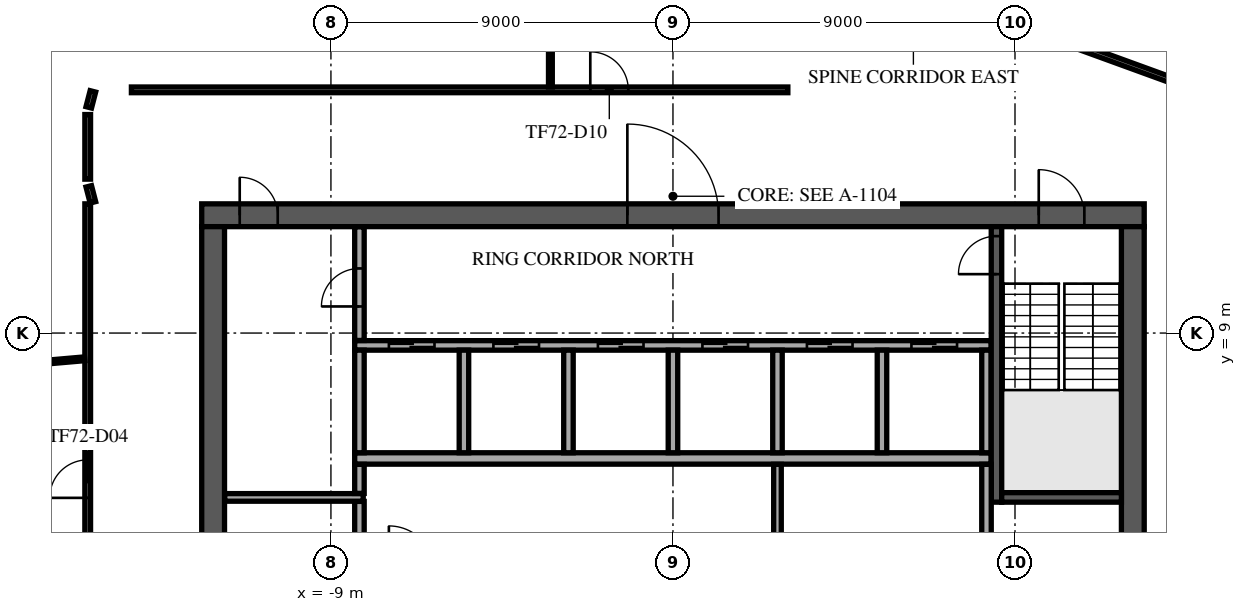
"""IFC4 building model, lengths in metres.
Left out: names, types, materials, properties, quantities, classifications, styles, units other than length and angle.
Written with IfcOpenShell. Run it as: python <this file> out.ifc"""

import sys

from ifc_helpers import new_model, si_unit, direction, frame, frame_2d, origin, place, context, subcontext, project, spatial, rectangle, extrude, element, fill, save


model = new_model("IFC4")
c1 = context("Model", 3, precision=1e-05, world=origin(), true_north=direction((0.0, 1.0)))
c2 = subcontext(c1, "Body", "Model", "MODEL_VIEW")
j1 = project(units=[si_unit("LENGTHUNIT", "METRE"), si_unit("PLANEANGLEUNIT", "RADIAN")], contexts=[c1])
p1 = place(None, origin())
s1 = spatial("IfcSite", under=j1, at=p1, CompositionType="ELEMENT")
p2 = place(p1, origin())
s2 = spatial("IfcBuilding", under=s1, at=p2, CompositionType="ELEMENT")
p3 = place(p2, frame((0.0, 0.0, 304.5)))
s3 = spatial("IfcBuildingStorey", under=s2, at=p3, CompositionType="ELEMENT", Elevation=304.5)
p4 = place(p3, frame((-12.4, 12.1, 0.0), z_axis=(0.0, 0.0, 1.0), x_axis=(1.0, 0.0, 0.0)))
e1 = element("IfcWall", 1, at=p4, inside=s3, PredefinedType="SHEAR", context=c2, shape_type="SweptSolid", body=[
    extrude(rectangle(XDim=24.8, YDim=0.6, at=frame_2d((12.4, 0.0))), origin(), (0.0, 0.0, 1.0), 3.65),
])
p5 = place(p4, frame((11.2, 0.0, 0.0)))
e2 = element("IfcOpeningElement", 2, at=p5, cuts=e1, PredefinedType="OPENING", context=c2, shape_type="SweptSolid", body=[
    extrude(rectangle(XDim=2.4, YDim=2.4, at=frame_2d((1.2, 1.2))), frame((0.0, 0.31, 0.0), z_axis=(0.0, -1.0, 0.0), x_axis=(1.0, 0.0, 0.0)), (0.0, 0.0, 1.0), 0.62),
])
p6 = place(p4, frame((22.025, 0.0, 0.0)))
e3 = element("IfcOpeningElement", 3, at=p6, cuts=e1, PredefinedType="OPENING", context=c2, shape_type="SweptSolid", body=[
    extrude(rectangle(XDim=1.2, YDim=2.1, at=frame_2d((0.6, 1.05))), frame((0.0, 0.31, 0.0), z_axis=(0.0, -1.0, 0.0), x_axis=(1.0, 0.0, 0.0)), (0.0, 0.0, 1.0), 0.62),
])
p7 = place(p4, frame((1.0, 0.0, 0.0)))
e4 = element("IfcOpeningElement", 4, at=p7, cuts=e1, PredefinedType="OPENING", context=c2, shape_type="SweptSolid", body=[
    extrude(rectangle(XDim=1.0, YDim=2.1, at=frame_2d((0.5, 1.05))), frame((0.0, 0.31, 0.0), z_axis=(0.0, -1.0, 0.0), x_axis=(1.0, 0.0, 0.0)), (0.0, 0.0, 1.0), 0.62),
])
p8 = place(p3, frame((12.1, -11.8, 0.0), z_axis=(0.0, 0.0, 1.0), x_axis=(0.0, 1.0, 0.0)))
e5 = element("IfcWall", 5, at=p8, inside=s3, PredefinedType="SHEAR", context=c2, shape_type="SweptSolid", body=[
    extrude(rectangle(XDim=23.6, YDim=0.6, at=frame_2d((11.8, 0.0))), origin(), (0.0, 0.0, 1.0), 3.65),
])
p9 = place(p8, frame((10.6, 0.0, 0.0)))
e6 = element("IfcOpeningElement", 6, at=p9, cuts=e5, PredefinedType="OPENING", context=c2, shape_type="SweptSolid", body=[
    extrude(rectangle(XDim=2.4, YDim=2.4, at=frame_2d((1.2, 1.2))), frame((0.0, 0.31, 0.0), z_axis=(0.0, -1.0, 0.0), x_axis=(1.0, 0.0, 0.0)), (0.0, 0.0, 1.0), 0.62),
])
p10 = place(p3, frame((-12.1, -11.8, 0.0), z_axis=(0.0, 0.0, 1.0), x_axis=(0.0, 1.0, 0.0)))
e7 = element("IfcWall", 7, at=p10, inside=s3, PredefinedType="SHEAR", context=c2, shape_type="SweptSolid", body=[
    extrude(rectangle(XDim=23.6, YDim=0.6, at=frame_2d((11.8, 0.0))), origin(), (0.0, 0.0, 1.0), 3.65),
])
p11 = place(p10, frame((10.6, 0.0, 0.0)))
e8 = element("IfcOpeningElement", 8, at=p11, cuts=e7, PredefinedType="OPENING", context=c2, shape_type="SweptSolid", body=[
    extrude(rectangle(XDim=2.4, YDim=2.4, at=frame_2d((1.2, 1.2))), frame((0.0, 0.31, 0.0), z_axis=(0.0, -1.0, 0.0), x_axis=(1.0, 0.0, 0.0)), (0.0, 0.0, 1.0), 0.62),
])
p12 = place(p3, frame((-8.375, 5.7, 0.0), z_axis=(0.0, 0.0, 1.0), x_axis=(1.0, 0.0, 0.0)))
e9 = element("IfcWall", 9, at=p12, inside=s3, PredefinedType="SOLIDWALL", context=c2, shape_type="SweptSolid", body=[
    extrude(rectangle(XDim=16.75, YDim=0.3, at=frame_2d((8.375, 0.0))), origin(), (0.0, 0.0, 1.0), 3.65),
])
p13 = place(p3, frame((-8.375, 8.675, 0.0), z_axis=(0.0, 0.0, 1.0), x_axis=(1.0, 0.0, 0.0)))
e10 = element("IfcWall", 10, at=p13, inside=s3, PredefinedType="SOLIDWALL", context=c2, shape_type="SweptSolid", body=[
    extrude(rectangle(XDim=16.75, YDim=0.25, at=frame_2d((8.375, 0.0))), origin(), (0.0, 0.0, 1.0), 3.65),
])
p14 = place(p13, frame((0.9, 0.0, 0.0)))
e11 = element("IfcOpeningElement", 11, at=p14, cuts=e10, PredefinedType="OPENING", context=c2, shape_type="SweptSolid", body=[
    extrude(rectangle(XDim=1.2, YDim=2.1, at=frame_2d((0.6, 1.05))), frame((0.0, 0.135, 0.0), z_axis=(0.0, -1.0, 0.0), x_axis=(1.0, 0.0, 0.0)), (0.0, 0.0, 1.0), 0.27),
])
p15 = place(p13, frame((3.65, 0.0, 0.0)))
e12 = element("IfcOpeningElement", 12, at=p15, cuts=e10, PredefinedType="OPENING", context=c2, shape_type="SweptSolid", body=[
    extrude(rectangle(XDim=1.2, YDim=2.1, at=frame_2d((0.6, 1.05))), frame((0.0, 0.135, 0.0), z_axis=(0.0, -1.0, 0.0), x_axis=(1.0, 0.0, 0.0)), (0.0, 0.0, 1.0), 0.27),
])
p16 = place(p13, frame((6.4, 0.0, 0.0)))
e13 = element("IfcOpeningElement", 13, at=p16, cuts=e10, PredefinedType="OPENING", context=c2, shape_type="SweptSolid", body=[
    extrude(rectangle(XDim=1.2, YDim=2.1, at=frame_2d((0.6, 1.05))), frame((0.0, 0.135, 0.0), z_axis=(0.0, -1.0, 0.0), x_axis=(1.0, 0.0, 0.0)), (0.0, 0.0, 1.0), 0.27),
])
p17 = place(p13, frame((9.15, 0.0, 0.0)))
e14 = element("IfcOpeningElement", 14, at=p17, cuts=e10, PredefinedType="OPENING", context=c2, shape_type="SweptSolid", body=[
    extrude(rectangle(XDim=1.2, YDim=2.1, at=frame_2d((0.6, 1.05))), frame((0.0, 0.135, 0.0), z_axis=(0.0, -1.0, 0.0), x_axis=(1.0, 0.0, 0.0)), (0.0, 0.0, 1.0), 0.27),
])
p18 = place(p13, frame((11.9, 0.0, 0.0)))
e15 = element("IfcOpeningElement", 15, at=p18, cuts=e10, PredefinedType="OPENING", context=c2, shape_type="SweptSolid", body=[
    extrude(rectangle(XDim=1.2, YDim=2.1, at=frame_2d((0.6, 1.05))), frame((0.0, 0.135, 0.0), z_axis=(0.0, -1.0, 0.0), x_axis=(1.0, 0.0, 0.0)), (0.0, 0.0, 1.0), 0.27),
])
p19 = place(p13, frame((14.65, 0.0, 0.0)))
e16 = element("IfcOpeningElement", 16, at=p19, cuts=e10, PredefinedType="OPENING", context=c2, shape_type="SweptSolid", body=[
    extrude(rectangle(XDim=1.2, YDim=2.1, at=frame_2d((0.6, 1.05))), frame((0.0, 0.135, 0.0), z_axis=(0.0, -1.0, 0.0), x_axis=(1.0, 0.0, 0.0)), (0.0, 0.0, 1.0), 0.27),
])
for number, where, z_axis, x_axis in (
    (17, (-8.25, 5.85, 0.0), (0.0, 0.0, 1.0), (0.0, 1.0, 0.0)),
    (18, (-5.5, 5.85, 0.0), (0.0, 0.0, 1.0), (0.0, 1.0, 0.0)),
    (19, (-2.75, 5.85, 0.0), (0.0, 0.0, 1.0), (0.0, 1.0, 0.0)),
    (20, (0.0, 5.85, 0.0), (0.0, 0.0, 1.0), (0.0, 1.0, 0.0)),
    (21, (2.75, 5.85, 0.0), (0.0, 0.0, 1.0), (0.0, 1.0, 0.0)),
    (22, (5.5, 5.85, 0.0), (0.0, 0.0, 1.0), (0.0, 1.0, 0.0)),
    (23, (8.25, 5.85, 0.0), (0.0, 0.0, 1.0), (0.0, 1.0, 0.0)),
):
    element("IfcWall", number, at=place(p3, frame(where, z_axis=z_axis, x_axis=x_axis)), inside=s3, PredefinedType="SOLIDWALL", context=c2, shape_type="SweptSolid", body=[
        extrude(rectangle(XDim=2.7, YDim=0.25, at=frame_2d((1.35, 0.0))), origin(), (0.0, 0.0, 1.0), 3.65),
    ])
p20 = place(p3, frame((8.512, 4.55, 0.0), z_axis=(0.0, 0.0, 1.0), x_axis=(0.0, 1.0, 0.0)))
e24 = element("IfcWall", 24, at=p20, inside=s3, PredefinedType="SOLIDWALL", context=c2, shape_type="SweptSolid", body=[
    extrude(rectangle(XDim=7.25, YDim=0.275, at=frame_2d((3.625, 0.0))), origin(), (0.0, 0.0, 1.0), 3.65),
])
p21 = place(p20, frame((6.0, 0.0, 0.0)))
e25 = element("IfcOpeningElement", 25, at=p21, cuts=e24, PredefinedType="OPENING", context=c2, shape_type="SweptSolid", body=[
    extrude(rectangle(XDim=1.0, YDim=2.1, at=frame_2d((0.5, 1.05))), frame((0.0, 0.147, 0.0), z_axis=(0.0, -1.0, 0.0), x_axis=(1.0, 0.0, 0.0)), (0.0, 0.0, 1.0), 0.295),
])
p22 = place(p3, frame((8.65, 4.675, 0.0), z_axis=(0.0, 0.0, 1.0), x_axis=(1.0, 0.0, 0.0)))
e26 = element("IfcWall", 26, at=p22, inside=s3, PredefinedType="SOLIDWALL", context=c2, shape_type="SweptSolid", body=[
    extrude(rectangle(XDim=3.15, YDim=0.25, at=frame_2d((1.575, 0.0))), origin(), (0.0, 0.0, 1.0), 3.65),
])
p23 = place(p3, frame((-8.25, 2.855, 0.0), z_axis=(0.0, 0.0, 1.0), x_axis=(0.0, 1.0, 0.0)))
e27 = element("IfcWall", 27, at=p23, inside=s3, PredefinedType="PARTITIONING", context=c2, shape_type="SweptSolid", body=[
    extrude(rectangle(XDim=1.715, YDim=0.25, at=frame_2d((0.857, 0.0))), origin(), (0.0, 0.0, 1.0), 3.65),
])
p24 = place(p3, frame((2.75, 2.855, 0.0), z_axis=(0.0, 0.0, 1.0), x_axis=(0.0, 1.0, 0.0)))
e28 = element("IfcWall", 28, at=p24, inside=s3, PredefinedType="PARTITIONING", context=c2, shape_type="SweptSolid", body=[
    extrude(rectangle(XDim=2.69, YDim=0.2, at=frame_2d((1.345, 0.0))), origin(), (0.0, 0.0, 1.0), 3.65),
])
p25 = place(p3, frame((8.25, 2.855, 0.0), z_axis=(0.0, 0.0, 1.0), x_axis=(0.0, 1.0, 0.0)))
e29 = element("IfcWall", 29, at=p25, inside=s3, PredefinedType="PARTITIONING", context=c2, shape_type="SweptSolid", body=[
    extrude(rectangle(XDim=2.69, YDim=0.25, at=frame_2d((1.345, 0.0))), origin(), (0.0, 0.0, 1.0), 3.65),
])
p26 = place(p3, frame((-11.795, 4.675, 0.0), z_axis=(0.0, 0.0, 1.0), x_axis=(1.0, 0.0, 0.0)))
e30 = element("IfcWall", 30, at=p26, inside=s3, PredefinedType="PARTITIONING", context=c2, shape_type="SweptSolid", body=[
    extrude(rectangle(XDim=3.645, YDim=0.2, at=frame_2d((1.823, 0.0))), origin(), (0.0, 0.0, 1.0), 3.65),
])
p27 = place(p3, frame((-8.25, 4.78, 0.0), z_axis=(0.0, 0.0, 1.0), x_axis=(0.0, 1.0, 0.0)))
e31 = element("IfcWall", 31, at=p27, inside=s3, PredefinedType="PARTITIONING", context=c2, shape_type="SweptSolid", body=[
    extrude(rectangle(XDim=0.765, YDim=0.25, at=frame_2d((0.382, 0.0))), origin(), (0.0, 0.0, 1.0), 3.65),
])
p28 = place(p3, frame((-8.25, 8.805, 0.0), z_axis=(0.0, 0.0, 1.0), x_axis=(0.0, 1.0, 0.0)))
e32 = element("IfcWall", 32, at=p28, inside=s3, PredefinedType="PARTITIONING", context=c2, shape_type="SweptSolid", body=[
    extrude(rectangle(XDim=2.99, YDim=0.25, at=frame_2d((1.495, 0.0))), origin(), (0.0, 0.0, 1.0), 3.65),
])
p29 = place(p28, frame((0.895, 0.0, 0.0)))
e33 = element("IfcOpeningElement", 33, at=p29, cuts=e32, PredefinedType="OPENING", context=c2, shape_type="SweptSolid", body=[
    extrude(rectangle(XDim=1.0, YDim=2.1, at=frame_2d((0.5, 1.05))), frame((0.0, 0.135, 0.0), z_axis=(0.0, -1.0, 0.0), x_axis=(1.0, 0.0, 0.0)), (0.0, 0.0, 1.0), 0.27),
])
p30 = place(p3, frame((-15.4, -12.161, 0.0), z_axis=(0.0, 0.0, 1.0), x_axis=(0.0, 1.0, 0.0)))
e34 = element("IfcWall", 34, at=p30, inside=s3, PredefinedType="PARTITIONING", context=c2, shape_type="SweptSolid", body=[
    extrude(rectangle(XDim=24.561, YDim=0.15, at=frame_2d((12.28, 0.0))), origin(), (0.0, 0.0, 1.0), 3.25),
])
p31 = place(p30, frame((0.8, 0.0, 0.0)))
e35 = element("IfcOpeningElement", 35, at=p31, cuts=e34, PredefinedType="OPENING", context=c2, shape_type="SweptSolid", body=[
    extrude(rectangle(XDim=1.8, YDim=2.1, at=frame_2d((0.9, 1.05))), frame((0.0, 0.085, 0.0), z_axis=(0.0, -1.0, 0.0), x_axis=(1.0, 0.0, 0.0)), (0.0, 0.0, 1.0), 0.17),
])
p32 = place(p30, frame((11.845, 0.0, 0.0)))
e36 = element("IfcOpeningElement", 36, at=p32, cuts=e34, PredefinedType="OPENING", context=c2, shape_type="SweptSolid", body=[
    extrude(rectangle(XDim=1.0, YDim=2.1, at=frame_2d((0.5, 1.05))), frame((0.0, 0.085, 0.0), z_axis=(0.0, -1.0, 0.0), x_axis=(1.0, 0.0, 0.0)), (0.0, 0.0, 1.0), 0.17),
])
p33 = place(p30, frame((16.824, 0.0, 0.0)))
e37 = element("IfcOpeningElement", 37, at=p33, cuts=e34, PredefinedType="OPENING", context=c2, shape_type="SweptSolid", body=[
    extrude(rectangle(XDim=1.0, YDim=2.1, at=frame_2d((0.5, 1.05))), frame((0.0, 0.085, 0.0), z_axis=(0.0, -1.0, 0.0), x_axis=(1.0, 0.0, 0.0)), (0.0, 0.0, 1.0), 0.17),
])
p34 = place(p3, frame((-15.4, 13.05, 0.0), z_axis=(0.0, 0.0, 1.0), x_axis=(0.0, 1.0, 0.0)))
e38 = element("IfcWall", 38, at=p34, inside=s3, PredefinedType="PARTITIONING", context=c2, shape_type="SweptSolid", body=[
    extrude(rectangle(XDim=1.7, YDim=0.15, at=frame_2d((0.85, 0.0))), origin(), (0.0, 0.0, 1.0), 3.25),
])
p35 = place(p3, frame((-15.263, 12.44, 0.0), z_axis=(0.0, 0.0, 1.0), x_axis=(-0.249928977064, 0.968264171817, 0.0)))
e39 = element("IfcWall", 39, at=p35, inside=s3, PredefinedType="PARTITIONING", context=c2, shape_type="SweptSolid", body=[
    extrude(rectangle(XDim=0.435, YDim=0.15, at=frame_2d((0.217, 0.0))), origin(), (0.0, 0.0, 1.0), 3.25),
])
p36 = place(p3, frame((-15.263, 15.36, 0.0), z_axis=(0.0, 0.0, 1.0), x_axis=(-0.250064963452, -0.968229060736, 0.0)))
e40 = element("IfcWall", 40, at=p36, inside=s3, PredefinedType="PARTITIONING", context=c2, shape_type="SweptSolid", body=[
    extrude(rectangle(XDim=0.435, YDim=0.15, at=frame_2d((0.217, 0.0))), origin(), (0.0, 0.0, 1.0), 3.25),
])
p37 = place(p3, frame((-14.25, 15.4, 0.0), z_axis=(0.0, 0.0, 1.0), x_axis=(1.0, 0.0, 0.0)))
e41 = element("IfcWall", 41, at=p37, inside=s3, PredefinedType="PARTITIONING", context=c2, shape_type="SweptSolid", body=[
    extrude(rectangle(XDim=17.273, YDim=0.15, at=frame_2d((8.637, 0.0))), origin(), (0.0, 0.0, 1.0), 3.25),
])
p38 = place(p37, frame((12.075, 0.0, 0.0)))
e42 = element("IfcOpeningElement", 42, at=p38, cuts=e41, PredefinedType="OPENING", context=c2, shape_type="SweptSolid", body=[
    extrude(rectangle(XDim=1.0, YDim=2.1, at=frame_2d((0.5, 1.05))), frame((0.0, 0.085, 0.0), z_axis=(0.0, -1.0, 0.0), x_axis=(1.0, 0.0, 0.0)), (0.0, 0.0, 1.0), 0.17),
])
p39 = place(p3, frame((-11.549, 24.631, 0.0), z_axis=(0.0, 0.0, 1.0), x_axis=(0.939685979246, -0.342038390256, 0.0)))
e43 = element("IfcWall", 43, at=p39, inside=s3, PredefinedType="PARTITIONING", context=c2, shape_type="SweptSolid", body=[
    extrude(rectangle(XDim=38.628, YDim=0.15, at=frame_2d((19.314, 0.0))), origin(), (0.0, 0.0, 1.0), 3.25),
])
p40 = place(p39, frame((5.05, 0.0, 0.0)))
e44 = element("IfcOpeningElement", 44, at=p40, cuts=e43, PredefinedType="OPENING", context=c2, shape_type="SweptSolid", body=[
    extrude(rectangle(XDim=1.8, YDim=2.1, at=frame_2d((0.9, 1.05))), frame((0.0, 0.085, 0.0), z_axis=(0.0, -1.0, 0.0), x_axis=(1.0, 0.0, 0.0)), (0.0, 0.0, 1.0), 0.17),
])
p41 = place(p39, frame((10.046, 0.0, 0.0)))
e45 = element("IfcOpeningElement", 45, at=p41, cuts=e43, PredefinedType="OPENING", context=c2, shape_type="SweptSolid", body=[
    extrude(rectangle(XDim=1.0, YDim=2.1, at=frame_2d((0.5, 1.05))), frame((0.0, 0.085, 0.0), z_axis=(0.0, -1.0, 0.0), x_axis=(1.0, 0.0, 0.0)), (0.0, 0.0, 1.0), 0.17),
])
p42 = place(p39, frame((15.561, 0.0, 0.0)))
e46 = element("IfcOpeningElement", 46, at=p42, cuts=e43, PredefinedType="OPENING", context=c2, shape_type="SweptSolid", body=[
    extrude(rectangle(XDim=1.0, YDim=2.1, at=frame_2d((0.5, 1.05))), frame((0.0, 0.085, 0.0), z_axis=(0.0, -1.0, 0.0), x_axis=(1.0, 0.0, 0.0)), (0.0, 0.0, 1.0), 0.17),
])
p43 = place(p39, frame((27.042, 0.0, 0.0)))
e47 = element("IfcOpeningElement", 47, at=p43, cuts=e43, PredefinedType="OPENING", context=c2, shape_type="SweptSolid", body=[
    extrude(rectangle(XDim=1.0, YDim=2.1, at=frame_2d((0.5, 1.05))), frame((0.0, 0.085, 0.0), z_axis=(0.0, -1.0, 0.0), x_axis=(1.0, 0.0, 0.0)), (0.0, 0.0, 1.0), 0.17),
])
p44 = place(p39, frame((35.506, 0.0, 0.0)))
e48 = element("IfcOpeningElement", 48, at=p44, cuts=e43, PredefinedType="OPENING", context=c2, shape_type="SweptSolid", body=[
    extrude(rectangle(XDim=1.0, YDim=2.1, at=frame_2d((0.5, 1.05))), frame((0.0, 0.085, 0.0), z_axis=(0.0, -1.0, 0.0), x_axis=(1.0, 0.0, 0.0)), (0.0, 0.0, 1.0), 0.17),
])
p45 = place(p3, frame((-23.203, 7.649, 0.0), z_axis=(0.0, 0.0, 1.0), x_axis=(0.996219171953, 0.086875551407, 0.0)))
e49 = element("IfcWall", 49, at=p45, inside=s3, PredefinedType="PARTITIONING", context=c2, shape_type="SweptSolid", body=[
    extrude(rectangle(XDim=7.753, YDim=0.1, at=frame_2d((3.877, 0.0))), origin(), (0.0, 0.0, 1.0), 3.13),
])
p46 = place(p3, frame((-3.225, 15.475, 0.0), z_axis=(0.0, 0.0, 1.0), x_axis=(0.0, 1.0, 0.0)))
e50 = element("IfcWall", 50, at=p46, inside=s3, PredefinedType="PARTITIONING", context=c2, shape_type="SweptSolid", body=[
    extrude(rectangle(XDim=3.475, YDim=0.1, at=frame_2d((1.737, 0.0))), origin(), (0.0, 0.0, 1.0), 3.25),
])
p47 = place(p5, origin())
e51 = element("IfcDoor", 51, at=p47, inside=s3, OperationType="SINGLE_SWING_LEFT", PredefinedType="DOOR", context=c2, shape_type="SweptSolid", body=[
    extrude(rectangle(XDim=2.4, YDim=2.4, at=frame_2d((1.2, 1.2))), frame((0.0, 0.025, 0.0), z_axis=(0.0, -1.0, 0.0), x_axis=(1.0, 0.0, 0.0)), (0.0, 0.0, 1.0), 0.05),
])
fill(e2, e51)
p48 = place(p6, origin())
e52 = element("IfcDoor", 52, at=p48, inside=s3, OperationType="SINGLE_SWING_LEFT", PredefinedType="DOOR", context=c2, shape_type="SweptSolid", body=[
    extrude(rectangle(XDim=1.2, YDim=2.1, at=frame_2d((0.6, 1.05))), frame((0.0, 0.025, 0.0), z_axis=(0.0, -1.0, 0.0), x_axis=(1.0, 0.0, 0.0)), (0.0, 0.0, 1.0), 0.05),
])
fill(e3, e52)
p49 = place(p7, origin())
e53 = element("IfcDoor", 53, at=p49, inside=s3, OperationType="SINGLE_SWING_LEFT", PredefinedType="DOOR", context=c2, shape_type="SweptSolid", body=[
    extrude(rectangle(XDim=1.0, YDim=2.1, at=frame_2d((0.5, 1.05))), frame((0.0, 0.025, 0.0), z_axis=(0.0, -1.0, 0.0), x_axis=(1.0, 0.0, 0.0)), (0.0, 0.0, 1.0), 0.05),
])
fill(e4, e53)
p50 = place(p14, origin())
e54 = element("IfcDoor", 54, at=p50, inside=s3, OperationType="DOUBLE_DOOR_SLIDING", PredefinedType="DOOR", context=c2, shape_type="SweptSolid", body=[
    extrude(rectangle(XDim=1.2, YDim=2.1, at=frame_2d((0.6, 1.05))), frame((0.0, 0.025, 0.0), z_axis=(0.0, -1.0, 0.0), x_axis=(1.0, 0.0, 0.0)), (0.0, 0.0, 1.0), 0.05),
])
fill(e11, e54)
p51 = place(p15, origin())
e55 = element("IfcDoor", 55, at=p51, inside=s3, OperationType="DOUBLE_DOOR_SLIDING", PredefinedType="DOOR", context=c2, shape_type="SweptSolid", body=[
    extrude(rectangle(XDim=1.2, YDim=2.1, at=frame_2d((0.6, 1.05))), frame((0.0, 0.025, 0.0), z_axis=(0.0, -1.0, 0.0), x_axis=(1.0, 0.0, 0.0)), (0.0, 0.0, 1.0), 0.05),
])
fill(e12, e55)
p52 = place(p16, origin())
e56 = element("IfcDoor", 56, at=p52, inside=s3, OperationType="DOUBLE_DOOR_SLIDING", PredefinedType="DOOR", context=c2, shape_type="SweptSolid", body=[
    extrude(rectangle(XDim=1.2, YDim=2.1, at=frame_2d((0.6, 1.05))), frame((0.0, 0.025, 0.0), z_axis=(0.0, -1.0, 0.0), x_axis=(1.0, 0.0, 0.0)), (0.0, 0.0, 1.0), 0.05),
])
fill(e13, e56)
p53 = place(p17, origin())
e57 = element("IfcDoor", 57, at=p53, inside=s3, OperationType="DOUBLE_DOOR_SLIDING", PredefinedType="DOOR", context=c2, shape_type="SweptSolid", body=[
    extrude(rectangle(XDim=1.2, YDim=2.1, at=frame_2d((0.6, 1.05))), frame((0.0, 0.025, 0.0), z_axis=(0.0, -1.0, 0.0), x_axis=(1.0, 0.0, 0.0)), (0.0, 0.0, 1.0), 0.05),
])
fill(e14, e57)
p54 = place(p18, origin())
e58 = element("IfcDoor", 58, at=p54, inside=s3, OperationType="DOUBLE_DOOR_SLIDING", PredefinedType="DOOR", context=c2, shape_type="SweptSolid", body=[
    extrude(rectangle(XDim=1.2, YDim=2.1, at=frame_2d((0.6, 1.05))), frame((0.0, 0.025, 0.0), z_axis=(0.0, -1.0, 0.0), x_axis=(1.0, 0.0, 0.0)), (0.0, 0.0, 1.0), 0.05),
])
fill(e15, e58)
p55 = place(p19, origin())
e59 = element("IfcDoor", 59, at=p55, inside=s3, OperationType="DOUBLE_DOOR_SLIDING", PredefinedType="DOOR", context=c2, shape_type="SweptSolid", body=[
    extrude(rectangle(XDim=1.2, YDim=2.1, at=frame_2d((0.6, 1.05))), frame((0.0, 0.025, 0.0), z_axis=(0.0, -1.0, 0.0), x_axis=(1.0, 0.0, 0.0)), (0.0, 0.0, 1.0), 0.05),
])
fill(e16, e59)
p56 = place(p21, origin())
e60 = element("IfcDoor", 60, at=p56, inside=s3, OperationType="SINGLE_SWING_LEFT", PredefinedType="DOOR", context=c2, shape_type="SweptSolid", body=[
    extrude(rectangle(XDim=1.0, YDim=2.1, at=frame_2d((0.5, 1.05))), frame((0.0, 0.025, 0.0), z_axis=(0.0, -1.0, 0.0), x_axis=(1.0, 0.0, 0.0)), (0.0, 0.0, 1.0), 0.05),
])
fill(e25, e60)
p57 = place(p29, origin())
e61 = element("IfcDoor", 61, at=p57, inside=s3, OperationType="SINGLE_SWING_LEFT", PredefinedType="DOOR", context=c2, shape_type="SweptSolid", body=[
    extrude(rectangle(XDim=1.0, YDim=2.1, at=frame_2d((0.5, 1.05))), frame((0.0, 0.025, 0.0), z_axis=(0.0, -1.0, 0.0), x_axis=(1.0, 0.0, 0.0)), (0.0, 0.0, 1.0), 0.05),
])
fill(e33, e61)
p58 = place(p33, origin())
e62 = element("IfcDoor", 62, at=p58, inside=s3, OperationType="SINGLE_SWING_RIGHT", PredefinedType="DOOR", context=c2, shape_type="SweptSolid", body=[
    extrude(rectangle(XDim=1.0, YDim=2.1, at=frame_2d((0.5, 1.05))), frame((0.0, 0.025, 0.0), z_axis=(0.0, -1.0, 0.0), x_axis=(1.0, 0.0, 0.0)), (0.0, 0.0, 1.0), 0.05),
])
fill(e37, e62)
p59 = place(p38, origin())
e63 = element("IfcDoor", 63, at=p59, inside=s3, OperationType="SINGLE_SWING_RIGHT", PredefinedType="DOOR", context=c2, shape_type="SweptSolid", body=[
    extrude(rectangle(XDim=1.0, YDim=2.1, at=frame_2d((0.5, 1.05))), frame((0.0, 0.025, 0.0), z_axis=(0.0, -1.0, 0.0), x_axis=(1.0, 0.0, 0.0)), (0.0, 0.0, 1.0), 0.05),
])
fill(e42, e63)
save(model, sys.argv[1])
